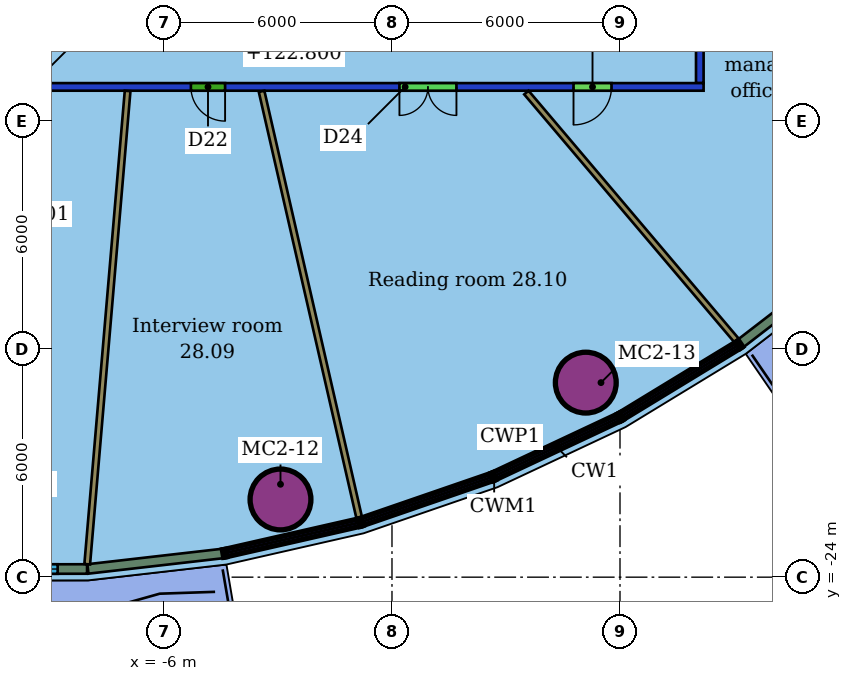
"""IFC4 building model, lengths in metres.
Left out: names, types, materials, properties, quantities, classifications, styles, units other than length and angle.
Written with IfcOpenShell. Run it as: python <this file> out.ifc"""

import sys

from ifc_helpers import new_model, si_unit, direction, frame, frame_2d, origin, origin_2d, place, context, subcontext, project, spatial, rectangle, hollow_circle, extrude, element, fill, save


model = new_model("IFC4")
c1 = context("Model", 3, precision=1e-05, world=origin(), true_north=direction((0.0, 1.0)))
c2 = subcontext(c1, "Body", "Model", "MODEL_VIEW")
j1 = project(units=[si_unit("LENGTHUNIT", "METRE"), si_unit("PLANEANGLEUNIT", "RADIAN")], contexts=[c1])
p1 = place(None, origin())
s1 = spatial("IfcSite", under=j1, at=p1, CompositionType="ELEMENT")
p2 = place(p1, origin())
s2 = spatial("IfcBuilding", under=s1, at=p2, CompositionType="ELEMENT")
p3 = place(p2, frame((0.0, 0.0, 121.0)))
s3 = spatial("IfcBuildingStorey", under=s2, at=p3, CompositionType="ELEMENT", Elevation=121.0)
for number, where, z_axis, x_axis in (
    (1, (-2.934, -21.956, 0.0), (0.0, 0.0, 1.0), (1.0, 0.0, 0.0)),
    (2, (5.1, -18.881, 0.0), (0.0, 0.0, 1.0), (1.0, 0.0, 0.0)),
):
    element("IfcColumn", number, at=place(p3, frame(where, z_axis=z_axis, x_axis=x_axis)), inside=s3, PredefinedType="COLUMN", context=c2, shape_type="SweptSolid", body=[
        extrude(hollow_circle(Radius=0.8, WallThickness=0.055, at=origin_2d()), origin(), (0.0, 0.0, 1.0), 3.45),
    ])
p4 = place(p3, frame((8.2, -11.1, 0.0), z_axis=(0.0, 0.0, 1.0), x_axis=(-1.0, 0.0, 0.0)))
e3 = element("IfcWall", 3, at=p4, inside=s3, PredefinedType="PARTITIONING", context=c2, shape_type="SweptSolid", body=[
    extrude(rectangle(XDim=28.4, YDim=0.2, at=frame_2d((14.2, 0.0))), origin(), (0.0, 0.0, 1.0), 3.0),
])
p5 = place(p4, frame((22.666, 0.0, 0.0)))
e4 = element("IfcOpeningElement", 4, at=p5, cuts=e3, PredefinedType="OPENING", context=c2, shape_type="SweptSolid", body=[
    extrude(rectangle(XDim=0.9, YDim=2.1, at=frame_2d((0.45, 1.05))), frame((0.0, 0.11, 0.0), z_axis=(0.0, -1.0, 0.0), x_axis=(1.0, 0.0, 0.0)), (0.0, 0.0, 1.0), 0.22),
])
p6 = place(p4, frame((17.362, 0.0, 0.0)))
e5 = element("IfcOpeningElement", 5, at=p6, cuts=e3, PredefinedType="OPENING", context=c2, shape_type="SweptSolid", body=[
    extrude(rectangle(XDim=1.8, YDim=2.4, at=frame_2d((0.9, 1.2))), frame((0.0, 0.11, 0.0), z_axis=(0.0, -1.0, 0.0), x_axis=(1.0, 0.0, 0.0)), (0.0, 0.0, 1.0), 0.22),
])
p7 = place(p4, frame((12.592, 0.0, 0.0)))
e6 = element("IfcOpeningElement", 6, at=p7, cuts=e3, PredefinedType="OPENING", context=c2, shape_type="SweptSolid", body=[
    extrude(rectangle(XDim=0.9, YDim=2.1, at=frame_2d((0.45, 1.05))), frame((0.0, 0.11, 0.0), z_axis=(0.0, -1.0, 0.0), x_axis=(1.0, 0.0, 0.0)), (0.0, 0.0, 1.0), 0.22),
])
p8 = place(p4, frame((6.504, 0.0, 0.0)))
e7 = element("IfcOpeningElement", 7, at=p8, cuts=e3, PredefinedType="OPENING", context=c2, shape_type="SweptSolid", body=[
    extrude(rectangle(XDim=1.5, YDim=2.1, at=frame_2d((0.75, 1.05))), frame((0.0, 0.11, 0.0), z_axis=(0.0, -1.0, 0.0), x_axis=(1.0, 0.0, 0.0)), (0.0, 0.0, 1.0), 0.22),
])
p9 = place(p4, frame((2.423, 0.0, 0.0)))
e8 = element("IfcOpeningElement", 8, at=p9, cuts=e3, PredefinedType="OPENING", context=c2, shape_type="SweptSolid", body=[
    extrude(rectangle(XDim=1.0, YDim=2.1, at=frame_2d((0.5, 1.05))), frame((0.0, 0.11, 0.0), z_axis=(0.0, -1.0, 0.0), x_axis=(1.0, 0.0, 0.0)), (0.0, 0.0, 1.0), 0.22),
])
p10 = place(p3, frame((8.1, 11.0, 0.0), z_axis=(0.0, 0.0, 1.0), x_axis=(0.0, -1.0, 0.0)))
e9 = element("IfcWall", 9, at=p10, inside=s3, PredefinedType="PARTITIONING", context=c2, shape_type="SweptSolid", body=[
    extrude(rectangle(XDim=22.0, YDim=0.2, at=frame_2d((11.0, 0.0))), origin(), (0.0, 0.0, 1.0), 3.0),
])
p11 = place(p10, frame((14.919, 0.0, 0.0)))
e10 = element("IfcOpeningElement", 10, at=p11, cuts=e9, PredefinedType="OPENING", context=c2, shape_type="SweptSolid", body=[
    extrude(rectangle(XDim=1.0, YDim=2.4, at=frame_2d((0.5, 1.2))), frame((0.0, 0.11, 0.0), z_axis=(0.0, -1.0, 0.0), x_axis=(1.0, 0.0, 0.0)), (0.0, 0.0, 1.0), 0.22),
])
p12 = place(p10, frame((8.285, 0.0, 0.0)))
e11 = element("IfcOpeningElement", 11, at=p12, cuts=e9, PredefinedType="OPENING", context=c2, shape_type="SweptSolid", body=[
    extrude(rectangle(XDim=0.9, YDim=2.1, at=frame_2d((0.45, 1.05))), frame((0.0, 0.11, 0.0), z_axis=(0.0, -1.0, 0.0), x_axis=(1.0, 0.0, 0.0)), (0.0, 0.0, 1.0), 0.22),
])
p13 = place(p3, frame((-8.02, -23.66, 0.0), z_axis=(0.0, 0.0, 1.0), x_axis=(0.085065958211, 0.996375322232, 0.0)))
e12 = element("IfcWall", 12, at=p13, inside=s3, PredefinedType="PARTITIONING", context=c2, shape_type="SweptSolid", body=[
    extrude(rectangle(XDim=12.499, YDim=0.15, at=frame_2d((6.25, 0.0))), origin(), (0.0, 0.0, 1.0), 3.45),
])
p14 = place(p3, frame((-0.862, -22.437, 0.0), z_axis=(0.0, 0.0, 1.0), x_axis=(-0.223218715067, 0.974768385435, 0.0)))
e13 = element("IfcWall", 13, at=p14, inside=s3, PredefinedType="PARTITIONING", context=c2, shape_type="SweptSolid", body=[
    extrude(rectangle(XDim=11.51, YDim=0.15, at=frame_2d((5.755, 0.0))), origin(), (0.0, 0.0, 1.0), 3.45),
])
p15 = place(p3, frame((9.069, -17.774, 0.0), z_axis=(0.0, 0.0, 1.0), x_axis=(-0.646671174143, 0.762768898509, 0.0)))
e14 = element("IfcWall", 14, at=p15, inside=s3, PredefinedType="PARTITIONING", context=c2, shape_type="SweptSolid", body=[
    extrude(rectangle(XDim=8.554, YDim=0.15, at=frame_2d((4.277, 0.0))), origin(), (0.0, 0.0, 1.0), 3.45),
])
p16 = place(p3, frame((16.688, -10.395, 0.0), z_axis=(0.0, 0.0, 1.0), x_axis=(-0.909112835196, 0.416549940443, 0.0)))
e15 = element("IfcWall", 15, at=p16, inside=s3, PredefinedType="PARTITIONING", context=c2, shape_type="SweptSolid", body=[
    extrude(rectangle(XDim=9.308, YDim=0.125, at=frame_2d((4.654, 0.0))), origin(), (0.0, 0.0, 1.0), 3.45),
])
p17 = place(p3, frame((-11.572, -23.79, 0.0), z_axis=(0.0, 0.0, 1.0), x_axis=(0.999999145394, 0.001307368318, 0.0)))
e16 = element("IfcWall", 16, at=p17, inside=s3, PredefinedType="SOLIDWALL", context=c2, shape_type="SweptSolid", body=[
    extrude(rectangle(XDim=3.548, YDim=0.25, at=frame_2d((1.774, 0.0))), origin(), (0.0, 0.0, 1.0), 3.05),
])
p18 = place(p17, frame((0.774, 0.0, 0.9)))
e17 = element("IfcOpeningElement", 17, at=p18, cuts=e16, PredefinedType="OPENING", context=c2, shape_type="SweptSolid", body=[
    extrude(rectangle(XDim=2.0, YDim=2.1, at=frame_2d((1.0, 1.05))), frame((0.0, 0.135, 0.0), z_axis=(0.0, -1.0, 0.0), x_axis=(1.0, 0.0, 0.0)), (0.0, 0.0, 1.0), 0.27),
])
p19 = place(p3, frame((-8.002, -23.783, 0.0), z_axis=(0.0, 0.0, 1.0), x_axis=(0.993503711569, 0.113799714842, 0.0)))
e18 = element("IfcWall", 18, at=p19, inside=s3, PredefinedType="SOLIDWALL", context=c2, shape_type="SweptSolid", body=[
    extrude(rectangle(XDim=3.563, YDim=0.25, at=frame_2d((1.782, 0.0))), origin(), (0.0, 0.0, 1.0), 3.05),
])
p20 = place(p3, frame((9.183, -17.843, 0.0), z_axis=(0.0, 0.0, 1.0), x_axis=(0.792037804, 0.610472044433, 0.0)))
e19 = element("IfcWall", 19, at=p20, inside=s3, PredefinedType="SOLIDWALL", context=c2, shape_type="SweptSolid", body=[
    extrude(rectangle(XDim=3.563, YDim=0.25, at=frame_2d((1.782, 0.0))), origin(), (0.0, 0.0, 1.0), 3.05),
])
p21 = place(p7, origin())
e20 = element("IfcDoor", 20, at=p21, inside=s3, OperationType="SINGLE_SWING_LEFT", PredefinedType="DOOR", context=c2, shape_type="SweptSolid", body=[
    extrude(rectangle(XDim=0.9, YDim=2.1, at=frame_2d((0.45, 1.05))), frame((0.0, 0.025, 0.0), z_axis=(0.0, -1.0, 0.0), x_axis=(1.0, 0.0, 0.0)), (0.0, 0.0, 1.0), 0.05),
])
fill(e6, e20)
p22 = place(p8, origin())
e21 = element("IfcDoor", 21, at=p22, inside=s3, OperationType="DOUBLE_DOOR_SINGLE_SWING", PredefinedType="DOOR", context=c2, shape_type="SweptSolid", body=[
    extrude(rectangle(XDim=1.5, YDim=2.1, at=frame_2d((0.75, 1.05))), frame((0.0, 0.025, 0.0), z_axis=(0.0, -1.0, 0.0), x_axis=(1.0, 0.0, 0.0)), (0.0, 0.0, 1.0), 0.05),
])
fill(e7, e21)
p23 = place(p9, origin())
e22 = element("IfcDoor", 22, at=p23, inside=s3, OperationType="SINGLE_SWING_RIGHT", PredefinedType="DOOR", context=c2, shape_type="SweptSolid", body=[
    extrude(rectangle(XDim=1.0, YDim=2.1, at=frame_2d((0.5, 1.05))), frame((0.0, 0.025, 0.0), z_axis=(0.0, -1.0, 0.0), x_axis=(1.0, 0.0, 0.0)), (0.0, 0.0, 1.0), 0.05),
])
fill(e8, e22)
p24 = place(p18, origin())
e23 = element("IfcWindow", 23, at=p24, inside=s3, PartitioningType="SINGLE_PANEL", PredefinedType="WINDOW", context=c2, shape_type="SweptSolid", body=[
    extrude(rectangle(XDim=2.0, YDim=2.1, at=frame_2d((1.0, 1.05))), frame((0.0, 0.03, 0.0), z_axis=(0.0, -1.0, 0.0), x_axis=(1.0, 0.0, 0.0)), (0.0, 0.0, 1.0), 0.06),
])
fill(e17, e23)
save(model, sys.argv[1])
